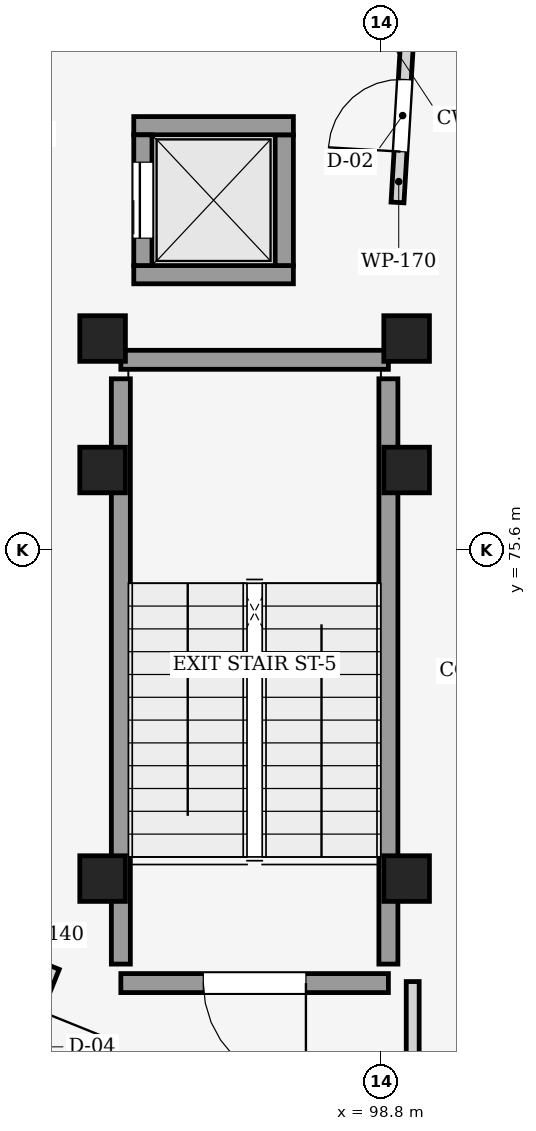
"""IFC4 building model, lengths in metres.
Left out: names, types, materials, properties, quantities, classifications, styles, units other than length and angle.
Written with IfcOpenShell. Run it as: python <this file> out.ifc"""

import sys

from ifc_helpers import new_model, si_unit, direction, frame, frame_2d, origin, origin_2d, place, context, subcontext, project, spatial, rectangle, extrude, element, fill, save


model = new_model("IFC4")
c1 = context("Model", 3, precision=1e-05, world=origin(), true_north=direction((0.0, 1.0)))
c2 = subcontext(c1, "Body", "Model", "MODEL_VIEW")
j1 = project(units=[si_unit("LENGTHUNIT", "METRE"), si_unit("PLANEANGLEUNIT", "RADIAN")], contexts=[c1])
p1 = place(None, origin())
s1 = spatial("IfcSite", under=j1, at=p1, CompositionType="ELEMENT")
p2 = place(p1, origin())
s2 = spatial("IfcBuilding", under=s1, at=p2, CompositionType="ELEMENT")
p3 = place(p2, frame((0.0, 0.0, 13.2)))
s3 = spatial("IfcBuildingStorey", under=s2, at=p3, CompositionType="ELEMENT", Elevation=13.2)
for number, where, z_axis, x_axis in (
    (1, (99.14, 71.275, 0.0), (0.0, 0.0, 1.0), (1.0, 0.0, 0.0)),
    (2, (95.14, 71.275, 0.0), (0.0, 0.0, 1.0), (1.0, 0.0, 0.0)),
    (3, (99.14, 76.65, 0.0), (0.0, 0.0, 1.0), (1.0, 0.0, 0.0)),
    (4, (95.14, 76.65, 0.0), (0.0, 0.0, 1.0), (1.0, 0.0, 0.0)),
    (5, (99.14, 78.38, 0.0), (0.0, 0.0, 1.0), (1.0, 0.0, 0.0)),
    (6, (95.14, 78.38, 0.0), (0.0, 0.0, 1.0), (1.0, 0.0, 0.0)),
):
    element("IfcColumn", number, at=place(p3, frame(where, z_axis=z_axis, x_axis=x_axis)), inside=s3, PredefinedType="COLUMN", context=c2, shape_type="SweptSolid", body=[
        extrude(rectangle(XDim=0.6, YDim=0.6, at=origin_2d()), origin(), (0.0, 0.0, 1.0), 4.05),
    ])
p4 = place(p3, frame((98.9, 69.9, 0.0), z_axis=(0.0, 0.0, 1.0), x_axis=(-1.0, 0.0, 0.0)))
e7 = element("IfcWall", 7, at=p4, inside=s3, PredefinedType="SHEAR", context=c2, shape_type="SweptSolid", body=[
    extrude(rectangle(XDim=3.52, YDim=0.25, at=frame_2d((1.76, 0.0))), origin(), (0.0, 0.0, 1.0), 4.05),
])
p5 = place(p4, frame((1.085, 0.0, 0.0)))
e8 = element("IfcOpeningElement", 8, at=p5, cuts=e7, PredefinedType="OPENING", context=c2, shape_type="SweptSolid", body=[
    extrude(rectangle(XDim=1.35, YDim=2.2, at=frame_2d((0.675, 1.1))), frame((0.0, 0.135, 0.0), z_axis=(0.0, -1.0, 0.0), x_axis=(1.0, 0.0, 0.0)), (0.0, 0.0, 1.0), 0.27),
])
p6 = place(p3, frame((95.38, 70.15, 0.0), z_axis=(0.0, 0.0, 1.0), x_axis=(0.0, 1.0, 0.0)))
e9 = element("IfcWall", 9, at=p6, inside=s3, PredefinedType="SHEAR", context=c2, shape_type="SweptSolid", body=[
    extrude(rectangle(XDim=7.7, YDim=0.25, at=frame_2d((3.85, 0.0))), origin(), (0.0, 0.0, 1.0), 4.05),
])
p7 = place(p3, frame((95.38, 78.1, 0.0), z_axis=(0.0, 0.0, 1.0), x_axis=(1.0, 0.0, 0.0)))
e10 = element("IfcWall", 10, at=p7, inside=s3, PredefinedType="SHEAR", context=c2, shape_type="SweptSolid", body=[
    extrude(rectangle(XDim=3.52, YDim=0.25, at=frame_2d((1.76, 0.0))), origin(), (0.0, 0.0, 1.0), 4.05),
])
p8 = place(p3, frame((98.9, 77.85, 0.0), z_axis=(0.0, 0.0, 1.0), x_axis=(0.0, -1.0, 0.0)))
e11 = element("IfcWall", 11, at=p8, inside=s3, PredefinedType="SHEAR", context=c2, shape_type="SweptSolid", body=[
    extrude(rectangle(XDim=7.7, YDim=0.25, at=frame_2d((3.85, 0.0))), origin(), (0.0, 0.0, 1.0), 4.05),
])
p9 = place(p3, frame((97.65, 79.22, 0.0), z_axis=(0.0, 0.0, 1.0), x_axis=(-1.0, 0.0, 0.0)))
e12 = element("IfcWall", 12, at=p9, inside=s3, PredefinedType="SHEAR", context=c2, shape_type="SweptSolid", body=[
    extrude(rectangle(XDim=2.1, YDim=0.24, at=frame_2d((1.05, 0.0))), origin(), (0.0, 0.0, 1.0), 4.05),
])
p10 = place(p3, frame((97.53, 81.06, 0.0), z_axis=(0.0, 0.0, 1.0), x_axis=(0.0, -1.0, 0.0)))
e13 = element("IfcWall", 13, at=p10, inside=s3, PredefinedType="SHEAR", context=c2, shape_type="SweptSolid", body=[
    extrude(rectangle(XDim=1.72, YDim=0.24, at=frame_2d((0.86, 0.0))), origin(), (0.0, 0.0, 1.0), 4.05),
])
p11 = place(p3, frame((95.55, 81.18, 0.0), z_axis=(0.0, 0.0, 1.0), x_axis=(1.0, 0.0, 0.0)))
e14 = element("IfcWall", 14, at=p11, inside=s3, PredefinedType="SHEAR", context=c2, shape_type="SweptSolid", body=[
    extrude(rectangle(XDim=2.1, YDim=0.24, at=frame_2d((1.05, 0.0))), origin(), (0.0, 0.0, 1.0), 4.05),
])
p12 = place(p3, frame((95.67, 79.34, 0.0), z_axis=(0.0, 0.0, 1.0), x_axis=(0.0, 1.0, 0.0)))
e15 = element("IfcWall", 15, at=p12, inside=s3, PredefinedType="SHEAR", context=c2, shape_type="SweptSolid", body=[
    extrude(rectangle(XDim=1.72, YDim=0.24, at=frame_2d((0.86, 0.0))), origin(), (0.0, 0.0, 1.0), 4.05),
])
p13 = place(p12, frame((0.36, 0.0, 0.0)))
e16 = element("IfcOpeningElement", 16, at=p13, cuts=e15, PredefinedType="OPENING", context=c2, shape_type="SweptSolid", body=[
    extrude(rectangle(XDim=1.0, YDim=2.15, at=frame_2d((0.5, 1.075))), frame((0.0, 0.13, 0.0), z_axis=(0.0, -1.0, 0.0), x_axis=(1.0, 0.0, 0.0)), (0.0, 0.0, 1.0), 0.26),
])
p14 = place(p3, frame((99.02, 80.17, 0.0), z_axis=(0.0, 0.0, 1.0), x_axis=(0.059365537617, 0.998236311173, 0.0)))
e17 = element("IfcWall", 17, at=p14, inside=s3, PredefinedType="PARTITIONING", context=c2, shape_type="SweptSolid", body=[
    extrude(rectangle(XDim=2.291, YDim=0.17, at=frame_2d((1.146, 0.0))), origin(), (0.0, 0.0, 1.0), 3.7),
])
p15 = place(p14, frame((0.67, 0.0, 0.0)))
e18 = element("IfcOpeningElement", 18, at=p15, cuts=e17, PredefinedType="OPENING", context=c2, shape_type="SweptSolid", body=[
    extrude(rectangle(XDim=0.95, YDim=2.1, at=frame_2d((0.475, 1.05))), frame((0.0, 0.095, 0.0), z_axis=(0.0, -1.0, 0.0), x_axis=(1.0, 0.0, 0.0)), (0.0, 0.0, 1.0), 0.19),
])
p16 = place(p3, frame((99.22, 67.378, 0.0), z_axis=(0.0, 0.0, 1.0), x_axis=(0.0, 1.0, 0.0)))
e19 = element("IfcWall", 19, at=p16, inside=s3, PredefinedType="PARTITIONING", context=c2, shape_type="SweptSolid", body=[
    extrude(rectangle(XDim=2.542, YDim=0.17, at=frame_2d((1.271, 0.0))), origin(), (0.0, 0.0, 1.0), 3.7),
])
p17 = place(p3, frame((94.504, 70.107, 0.0), z_axis=(0.0, 0.0, 1.0), x_axis=(-0.373687233103, -0.927554770251, 0.0)))
e20 = element("IfcWall", 20, at=p17, inside=s3, PredefinedType="PARTITIONING", context=c2, shape_type="SweptSolid", body=[
    extrude(rectangle(XDim=2.253, YDim=0.14, at=frame_2d((1.127, 0.0))), origin(), (0.0, 0.0, 1.0), 3.7),
])
p18 = place(p17, frame((0.602, 0.0, 0.0)))
e21 = element("IfcOpeningElement", 21, at=p18, cuts=e20, PredefinedType="OPENING", context=c2, shape_type="SweptSolid", body=[
    extrude(rectangle(XDim=1.05, YDim=2.1, at=frame_2d((0.525, 1.05))), frame((0.0, 0.08, 0.0), z_axis=(0.0, -1.0, 0.0), x_axis=(1.0, 0.0, 0.0)), (0.0, 0.0, 1.0), 0.16),
])
p19 = place(p5, origin())
e22 = element("IfcDoor", 22, at=p19, inside=s3, OperationType="SINGLE_SWING_LEFT", PredefinedType="DOOR", context=c2, shape_type="SweptSolid", body=[
    extrude(rectangle(XDim=1.35, YDim=2.2, at=frame_2d((0.675, 1.1))), frame((0.0, 0.025, 0.0), z_axis=(0.0, -1.0, 0.0), x_axis=(1.0, 0.0, 0.0)), (0.0, 0.0, 1.0), 0.05),
])
fill(e8, e22)
p20 = place(p13, origin())
e23 = element("IfcDoor", 23, at=p20, inside=s3, OperationType="SLIDING_TO_LEFT", PredefinedType="DOOR", context=c2, shape_type="SweptSolid", body=[
    extrude(rectangle(XDim=1.0, YDim=2.15, at=frame_2d((0.5, 1.075))), frame((0.0, 0.025, 0.0), z_axis=(0.0, -1.0, 0.0), x_axis=(1.0, 0.0, 0.0)), (0.0, 0.0, 1.0), 0.05),
])
fill(e16, e23)
p21 = place(p15, origin())
e24 = element("IfcDoor", 24, at=p21, inside=s3, OperationType="SINGLE_SWING_LEFT", PredefinedType="DOOR", context=c2, shape_type="SweptSolid", body=[
    extrude(rectangle(XDim=0.95, YDim=2.1, at=frame_2d((0.475, 1.05))), frame((0.0, 0.025, 0.0), z_axis=(0.0, -1.0, 0.0), x_axis=(1.0, 0.0, 0.0)), (0.0, 0.0, 1.0), 0.05),
])
fill(e18, e24)
save(model, sys.argv[1])
